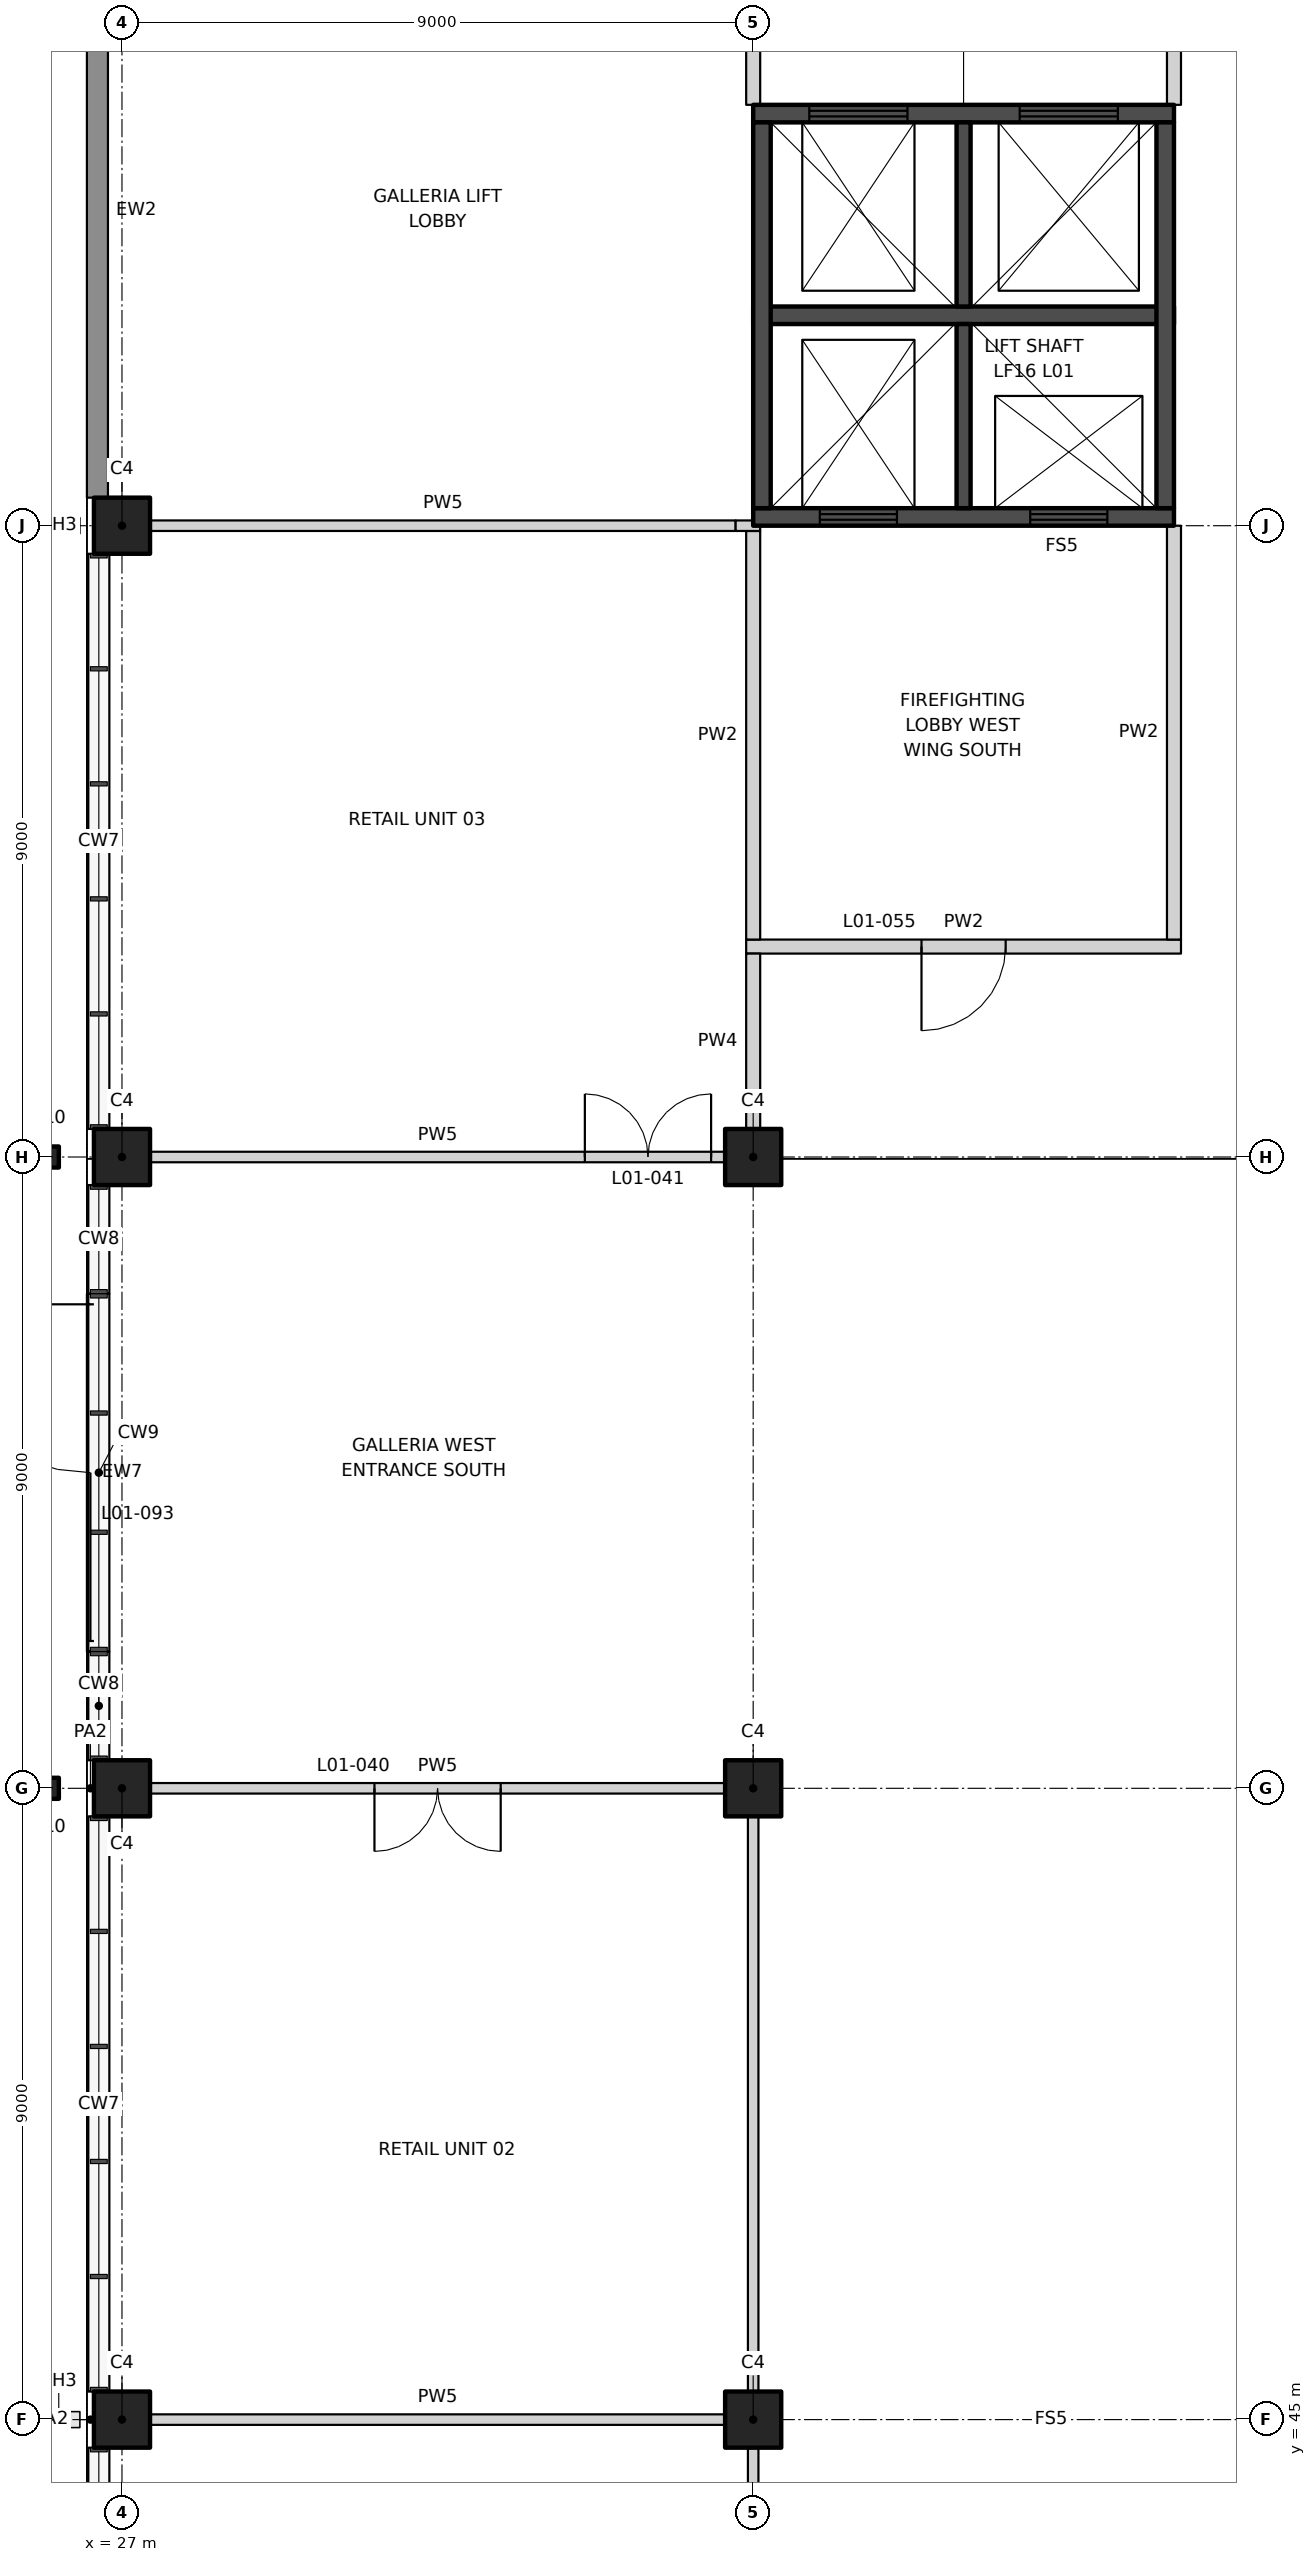
"""IFC4 building model, lengths in metres.
Left out: names, types, materials, properties, quantities, classifications, styles, units other than length and angle.
Written with IfcOpenShell. Run it as: python <this file> out.ifc"""

import sys

from ifc_helpers import new_model, si_unit, direction, frame, frame_2d, origin, origin_2d, place, context, subcontext, project, spatial, rectangle, hollow_rectangle, extrude, element, fill, save


model = new_model("IFC4")
c1 = context("Model", 3, precision=1e-05, world=origin(), true_north=direction((0.0, 1.0)))
c2 = subcontext(c1, "Body", "Model", "MODEL_VIEW")
j1 = project(units=[si_unit("LENGTHUNIT", "METRE"), si_unit("PLANEANGLEUNIT", "RADIAN")], contexts=[c1])
p1 = place(None, origin())
s1 = spatial("IfcSite", under=j1, at=p1, CompositionType="ELEMENT")
p2 = place(p1, origin())
s2 = spatial("IfcBuilding", under=s1, at=p2, CompositionType="ELEMENT")
p3 = place(p2, frame((0.0, 0.0, 7.0)))
s3 = spatial("IfcBuildingStorey", under=s2, at=p3, CompositionType="ELEMENT", Elevation=7.0)
for number, where, z_axis, x_axis in (
    (1, (27.0, 45.0, 0.0), (0.0, 0.0, 1.0), (1.0, 0.0, 0.0)),
    (2, (27.0, 54.0, 0.0), (0.0, 0.0, 1.0), (1.0, 0.0, 0.0)),
    (3, (27.0, 63.0, 0.0), (0.0, 0.0, 1.0), (1.0, 0.0, 0.0)),
    (4, (27.0, 72.0, 0.0), (0.0, 0.0, 1.0), (1.0, 0.0, 0.0)),
    (5, (36.0, 45.0, 0.0), (0.0, 0.0, 1.0), (1.0, 0.0, 0.0)),
    (6, (36.0, 54.0, 0.0), (0.0, 0.0, 1.0), (1.0, 0.0, 0.0)),
    (7, (36.0, 63.0, 0.0), (0.0, 0.0, 1.0), (1.0, 0.0, 0.0)),
):
    element("IfcColumn", number, at=place(p3, frame(where, z_axis=z_axis, x_axis=x_axis)), inside=s3, PredefinedType="COLUMN", context=c2, shape_type="SweptSolid", body=[
        extrude(rectangle(XDim=0.8, YDim=0.8, at=origin_2d()), origin(), (0.0, 0.0, 1.0), 4.5),
    ])
p4 = place(p3, frame((27.4, 45.0, 0.0), z_axis=(0.0, 0.0, 1.0), x_axis=(1.0, 0.0, 0.0)))
e8 = element("IfcWall", 8, at=p4, inside=s3, PredefinedType="PARTITIONING", context=c2, shape_type="SweptSolid", body=[
    extrude(rectangle(XDim=8.2, YDim=0.15, at=frame_2d((4.1, 0.0))), origin(), (0.0, 0.0, 1.0), 3.25),
])
p5 = place(p3, frame((27.4, 54.0, 0.0), z_axis=(0.0, 0.0, 1.0), x_axis=(1.0, 0.0, 0.0)))
e9 = element("IfcWall", 9, at=p5, inside=s3, PredefinedType="PARTITIONING", context=c2, shape_type="SweptSolid", body=[
    extrude(rectangle(XDim=8.2, YDim=0.15, at=frame_2d((4.1, 0.0))), origin(), (0.0, 0.0, 1.0), 3.25),
])
p6 = place(p5, frame((3.2, 0.0, 0.0)))
e10 = element("IfcOpeningElement", 10, at=p6, cuts=e9, PredefinedType="OPENING", context=c2, shape_type="SweptSolid", body=[
    extrude(rectangle(XDim=1.8, YDim=2.1, at=frame_2d((0.9, 1.05))), frame((0.0, 0.085, 0.0), z_axis=(0.0, -1.0, 0.0), x_axis=(1.0, 0.0, 0.0)), (0.0, 0.0, 1.0), 0.17),
])
p7 = place(p3, frame((27.4, 63.0, 0.0), z_axis=(0.0, 0.0, 1.0), x_axis=(1.0, 0.0, 0.0)))
e11 = element("IfcWall", 11, at=p7, inside=s3, PredefinedType="PARTITIONING", context=c2, shape_type="SweptSolid", body=[
    extrude(rectangle(XDim=8.2, YDim=0.15, at=frame_2d((4.1, 0.0))), origin(), (0.0, 0.0, 1.0), 3.25),
])
p8 = place(p7, frame((6.2, 0.0, 0.0)))
e12 = element("IfcOpeningElement", 12, at=p8, cuts=e11, PredefinedType="OPENING", context=c2, shape_type="SweptSolid", body=[
    extrude(rectangle(XDim=1.8, YDim=2.1, at=frame_2d((0.9, 1.05))), frame((0.0, 0.085, 0.0), z_axis=(0.0, -1.0, 0.0), x_axis=(1.0, 0.0, 0.0)), (0.0, 0.0, 1.0), 0.17),
])
p9 = place(p3, frame((35.9, 66.0, 0.0), z_axis=(0.0, 0.0, 1.0), x_axis=(1.0, 0.0, 0.0)))
e13 = element("IfcWall", 13, at=p9, inside=s3, PredefinedType="PARTITIONING", context=c2, shape_type="SweptSolid", body=[
    extrude(rectangle(XDim=6.2, YDim=0.2, at=frame_2d((3.1, 0.0))), origin(), (0.0, 0.0, 1.0), 4.5),
])
p10 = place(p9, frame((2.5, 0.0, 0.0)))
e14 = element("IfcOpeningElement", 14, at=p10, cuts=e13, PredefinedType="OPENING", context=c2, shape_type="SweptSolid", body=[
    extrude(rectangle(XDim=1.2, YDim=2.1, at=frame_2d((0.6, 1.05))), frame((0.0, 0.11, 0.0), z_axis=(0.0, -1.0, 0.0), x_axis=(1.0, 0.0, 0.0)), (0.0, 0.0, 1.0), 0.22),
])
p11 = place(p3, frame((27.4, 72.0, 0.0), z_axis=(0.0, 0.0, 1.0), x_axis=(1.0, 0.0, 0.0)))
e15 = element("IfcWall", 15, at=p11, inside=s3, PredefinedType="PARTITIONING", context=c2, shape_type="SweptSolid", body=[
    extrude(rectangle(XDim=8.35, YDim=0.15, at=frame_2d((4.175, 0.0))), origin(), (0.0, 0.0, 1.0), 3.25),
])
p12 = place(p3, frame((36.0, 36.0, 0.0), z_axis=(0.0, 0.0, 1.0), x_axis=(0.0, 1.0, 0.0)))
e16 = element("IfcWall", 16, at=p12, inside=s3, PredefinedType="PARTITIONING", context=c2, shape_type="SweptSolid", body=[
    extrude(rectangle(XDim=8.6, YDim=0.15, at=frame_2d((4.3, 0.0))), origin(), (0.0, 0.0, 1.0), 3.25),
])
p13 = place(p12, frame((3.4, 0.0, 0.0)))
e17 = element("IfcOpeningElement", 17, at=p13, cuts=e16, PredefinedType="OPENING", context=c2, shape_type="SweptSolid", body=[
    extrude(rectangle(XDim=1.8, YDim=2.1, at=frame_2d((0.9, 1.05))), frame((0.0, 0.085, 0.0), z_axis=(0.0, -1.0, 0.0), x_axis=(1.0, 0.0, 0.0)), (0.0, 0.0, 1.0), 0.17),
])
p14 = place(p3, frame((36.0, 45.4, 0.0), z_axis=(0.0, 0.0, 1.0), x_axis=(0.0, 1.0, 0.0)))
e18 = element("IfcWall", 18, at=p14, inside=s3, PredefinedType="PARTITIONING", context=c2, shape_type="SweptSolid", body=[
    extrude(rectangle(XDim=8.2, YDim=0.15, at=frame_2d((4.1, 0.0))), origin(), (0.0, 0.0, 1.0), 3.25),
])
p15 = place(p3, frame((36.0, 63.4, 0.0), z_axis=(0.0, 0.0, 1.0), x_axis=(0.0, 1.0, 0.0)))
e19 = element("IfcWall", 19, at=p15, inside=s3, PredefinedType="PARTITIONING", context=c2, shape_type="SweptSolid", body=[
    extrude(rectangle(XDim=2.5, YDim=0.2, at=frame_2d((1.25, 0.0))), origin(), (0.0, 0.0, 1.0), 3.25),
])
p16 = place(p3, frame((36.0, 66.1, 0.0), z_axis=(0.0, 0.0, 1.0), x_axis=(0.0, 1.0, 0.0)))
e20 = element("IfcWall", 20, at=p16, inside=s3, PredefinedType="PARTITIONING", context=c2, shape_type="SweptSolid", body=[
    extrude(rectangle(XDim=5.825, YDim=0.2, at=frame_2d((2.913, 0.0))), origin(), (0.0, 0.0, 1.0), 3.25),
])
p17 = place(p3, frame((36.0, 78.0, 0.0), z_axis=(0.0, 0.0, 1.0), x_axis=(0.0, 1.0, 0.0)))
e21 = element("IfcWall", 21, at=p17, inside=s3, PredefinedType="PARTITIONING", context=c2, shape_type="SweptSolid", body=[
    extrude(rectangle(XDim=2.6, YDim=0.2, at=frame_2d((1.3, 0.0))), origin(), (0.0, 0.0, 1.0), 3.45),
])
p18 = place(p3, frame((42.0, 66.1, 0.0), z_axis=(0.0, 0.0, 1.0), x_axis=(0.0, 1.0, 0.0)))
e22 = element("IfcWall", 22, at=p18, inside=s3, PredefinedType="PARTITIONING", context=c2, shape_type="SweptSolid", body=[
    extrude(rectangle(XDim=5.9, YDim=0.2, at=frame_2d((2.95, 0.0))), origin(), (0.0, 0.0, 1.0), 4.5),
])
p19 = place(p3, frame((42.0, 78.0, 0.0), z_axis=(0.0, 0.0, 1.0), x_axis=(0.0, 1.0, 0.0)))
e23 = element("IfcWall", 23, at=p19, inside=s3, PredefinedType="PARTITIONING", context=c2, shape_type="SweptSolid", body=[
    extrude(rectangle(XDim=3.0, YDim=0.2, at=frame_2d((1.5, 0.0))), origin(), (0.0, 0.0, 1.0), 4.5),
])
p20 = place(p3, frame((26.55, 61.05, 0.0), z_axis=(0.0, 0.0, 1.0), x_axis=(0.0, -1.0, 0.0)))
e24 = element("IfcWall", 24, at=p20, inside=s3, PredefinedType="SOLIDWALL", context=c2, shape_type="SweptSolid", body=[
    extrude(rectangle(XDim=5.1, YDim=0.1, at=frame_2d((2.55, 0.0))), origin(), (0.0, 0.0, 1.0), 3.1),
])
p21 = place(p20, frame((0.15, 0.0, 0.0)))
e25 = element("IfcOpeningElement", 25, at=p21, cuts=e24, PredefinedType="OPENING", context=c2, shape_type="SweptSolid", body=[
    extrude(rectangle(XDim=4.8, YDim=2.7, at=frame_2d((2.4, 1.35))), frame((0.0, 0.06, 0.0), z_axis=(0.0, -1.0, 0.0), x_axis=(1.0, 0.0, 0.0)), (0.0, 0.0, 1.0), 0.12),
])
p22 = place(p3, frame((26.65, 80.6, 0.0), z_axis=(0.0, 0.0, 1.0), x_axis=(0.0, -1.0, 0.0)))
e26 = element("IfcWall", 26, at=p22, inside=s3, PredefinedType="SOLIDWALL", context=c2, shape_type="SweptSolid", body=[
    extrude(rectangle(XDim=8.2, YDim=0.3, at=frame_2d((4.1, 0.0))), origin(), (0.0, 0.0, 1.0), 4.5),
])
for number, where, z_axis, x_axis in (
    (27, (25.95, 54.0, 0.0), (0.0, 0.0, 1.0), (1.0, 0.0, 0.0)),
    (28, (25.95, 63.0, 0.0), (0.0, 0.0, 1.0), (1.0, 0.0, 0.0)),
):
    element("IfcColumn", number, at=place(p3, frame(where, z_axis=z_axis, x_axis=x_axis)), inside=s3, PredefinedType="COLUMN", context=c2, shape_type="SweptSolid", body=[
        extrude(hollow_rectangle(XDim=0.3, YDim=0.3, WallThickness=0.012, at=origin_2d()), origin(), (0.0, 0.0, 1.0), 4.5),
    ])
p23 = place(p3, frame((36.0, 72.125, 0.0), z_axis=(0.0, 0.0, 1.0), x_axis=(1.0, 0.0, 0.0)))
e29 = element("IfcWall", 29, at=p23, inside=s3, PredefinedType="SHEAR", context=c2, shape_type="SweptSolid", body=[
    extrude(rectangle(XDim=6.0, YDim=0.25, at=frame_2d((3.0, 0.0))), origin(), (0.0, 0.0, 1.0), 4.15),
])
p24 = place(p23, frame((0.95, 0.0, 0.0)))
e30 = element("IfcOpeningElement", 30, at=p24, cuts=e29, PredefinedType="OPENING", context=c2, shape_type="SweptSolid", body=[
    extrude(rectangle(XDim=1.1, YDim=2.1, at=frame_2d((0.55, 1.05))), frame((0.0, 0.135, 0.0), z_axis=(0.0, -1.0, 0.0), x_axis=(1.0, 0.0, 0.0)), (0.0, 0.0, 1.0), 0.27),
])
p25 = place(p23, frame((3.95, 0.0, 0.0)))
e31 = element("IfcOpeningElement", 31, at=p25, cuts=e29, PredefinedType="OPENING", context=c2, shape_type="SweptSolid", body=[
    extrude(rectangle(XDim=1.1, YDim=2.1, at=frame_2d((0.55, 1.05))), frame((0.0, 0.135, 0.0), z_axis=(0.0, -1.0, 0.0), x_axis=(1.0, 0.0, 0.0)), (0.0, 0.0, 1.0), 0.27),
])
p26 = place(p3, frame((36.0, 77.875, 0.0), z_axis=(0.0, 0.0, 1.0), x_axis=(1.0, 0.0, 0.0)))
e32 = element("IfcWall", 32, at=p26, inside=s3, PredefinedType="SHEAR", context=c2, shape_type="SweptSolid", body=[
    extrude(rectangle(XDim=6.0, YDim=0.25, at=frame_2d((3.0, 0.0))), origin(), (0.0, 0.0, 1.0), 4.15),
])
p27 = place(p26, frame((0.8, 0.0, 0.0)))
e33 = element("IfcOpeningElement", 33, at=p27, cuts=e32, PredefinedType="OPENING", context=c2, shape_type="SweptSolid", body=[
    extrude(rectangle(XDim=1.4, YDim=2.1, at=frame_2d((0.7, 1.05))), frame((0.0, 0.135, 0.0), z_axis=(0.0, -1.0, 0.0), x_axis=(1.0, 0.0, 0.0)), (0.0, 0.0, 1.0), 0.27),
])
p28 = place(p26, frame((3.8, 0.0, 0.0)))
e34 = element("IfcOpeningElement", 34, at=p28, cuts=e32, PredefinedType="OPENING", context=c2, shape_type="SweptSolid", body=[
    extrude(rectangle(XDim=1.4, YDim=2.1, at=frame_2d((0.7, 1.05))), frame((0.0, 0.135, 0.0), z_axis=(0.0, -1.0, 0.0), x_axis=(1.0, 0.0, 0.0)), (0.0, 0.0, 1.0), 0.27),
])
p29 = place(p3, frame((36.0, 75.0, 0.0), z_axis=(0.0, 0.0, 1.0), x_axis=(1.0, 0.0, 0.0)))
e35 = element("IfcWall", 35, at=p29, inside=s3, PredefinedType="SHEAR", context=c2, shape_type="SweptSolid", body=[
    extrude(rectangle(XDim=6.0, YDim=0.25, at=frame_2d((3.0, 0.0))), origin(), (0.0, 0.0, 1.0), 4.15),
])
for number, where, z_axis, x_axis in (
    (36, (36.125, 72.25, 0.0), (0.0, 0.0, 1.0), (0.0, 1.0, 0.0)),
    (37, (41.875, 72.25, 0.0), (0.0, 0.0, 1.0), (0.0, 1.0, 0.0)),
):
    element("IfcWall", number, at=place(p3, frame(where, z_axis=z_axis, x_axis=x_axis)), inside=s3, PredefinedType="SHEAR", context=c2, shape_type="SweptSolid", body=[
        extrude(rectangle(XDim=5.5, YDim=0.25, at=frame_2d((2.75, 0.0))), origin(), (0.0, 0.0, 1.0), 4.15),
    ])
for number, where, z_axis, x_axis in (
    (38, (39.0, 72.25, 0.0), (0.0, 0.0, 1.0), (0.0, 1.0, 0.0)),
    (39, (39.0, 75.125, 0.0), (0.0, 0.0, 1.0), (0.0, 1.0, 0.0)),
):
    element("IfcWall", number, at=place(p3, frame(where, z_axis=z_axis, x_axis=x_axis)), inside=s3, PredefinedType="SHEAR", context=c2, shape_type="SweptSolid", body=[
        extrude(rectangle(XDim=2.625, YDim=0.2, at=frame_2d((1.312, 0.0))), origin(), (0.0, 0.0, 1.0), 4.15),
    ])
p30 = place(p3, frame((35.75, 72.0, 0.0), z_axis=(0.0, 0.0, 1.0), x_axis=(1.0, 0.0, 0.0)))
e40 = element("IfcWall", 40, at=p30, inside=s3, PredefinedType="PARTITIONING", context=c2, shape_type="SweptSolid", body=[
    extrude(rectangle(XDim=0.35, YDim=0.15, at=frame_2d((0.175, 0.0))), origin(), (0.0, 0.0, 1.0), 4.5),
])
p31 = place(p6, frame((1.8, 0.0, 0.0), z_axis=(0.0, 0.0, 1.0), x_axis=(-1.0, 0.0, 0.0)))
e41 = element("IfcDoor", 41, at=p31, inside=s3, OperationType="DOUBLE_DOOR_DOUBLE_SWING", PredefinedType="DOOR", context=c2, shape_type="SweptSolid", body=[
    extrude(rectangle(XDim=1.8, YDim=2.1, at=frame_2d((0.9, 1.05))), frame((0.0, 0.025, 0.0), z_axis=(0.0, -1.0, 0.0), x_axis=(1.0, 0.0, 0.0)), (0.0, 0.0, 1.0), 0.05),
])
fill(e10, e41)
p32 = place(p8, origin())
e42 = element("IfcDoor", 42, at=p32, inside=s3, OperationType="DOUBLE_DOOR_DOUBLE_SWING", PredefinedType="DOOR", context=c2, shape_type="SweptSolid", body=[
    extrude(rectangle(XDim=1.8, YDim=2.1, at=frame_2d((0.9, 1.05))), frame((0.0, 0.025, 0.0), z_axis=(0.0, -1.0, 0.0), x_axis=(1.0, 0.0, 0.0)), (0.0, 0.0, 1.0), 0.05),
])
fill(e12, e42)
p33 = place(p10, frame((1.2, 0.0, 0.0), z_axis=(0.0, 0.0, 1.0), x_axis=(-1.0, 0.0, 0.0)))
e43 = element("IfcDoor", 43, at=p33, inside=s3, OperationType="SINGLE_SWING_RIGHT", PredefinedType="DOOR", context=c2, shape_type="SweptSolid", body=[
    extrude(rectangle(XDim=1.2, YDim=2.1, at=frame_2d((0.6, 1.05))), frame((0.0, 0.025, 0.0), z_axis=(0.0, -1.0, 0.0), x_axis=(1.0, 0.0, 0.0)), (0.0, 0.0, 1.0), 0.05),
])
fill(e14, e43)
p34 = place(p21, frame((4.8, 0.0, 0.0), z_axis=(0.0, 0.0, 1.0), x_axis=(-1.0, 0.0, 0.0)))
e44 = element("IfcDoor", 44, at=p34, inside=s3, OperationType="DOUBLE_DOOR_SINGLE_SWING", PredefinedType="DOOR", context=c2, shape_type="SweptSolid", body=[
    extrude(rectangle(XDim=4.8, YDim=2.7, at=frame_2d((2.4, 1.35))), frame((0.0, 0.025, 0.0), z_axis=(0.0, -1.0, 0.0), x_axis=(1.0, 0.0, 0.0)), (0.0, 0.0, 1.0), 0.05),
])
fill(e25, e44)
p35 = place(p24, origin())
e45 = element("IfcDoor", 45, at=p35, inside=s3, OperationType="DOUBLE_DOOR_SLIDING", PredefinedType="DOOR", context=c2, shape_type="SweptSolid", body=[
    extrude(rectangle(XDim=1.1, YDim=2.1, at=frame_2d((0.55, 1.05))), frame((0.0, 0.025, 0.0), z_axis=(0.0, -1.0, 0.0), x_axis=(1.0, 0.0, 0.0)), (0.0, 0.0, 1.0), 0.05),
])
fill(e30, e45)
p36 = place(p25, origin())
e46 = element("IfcDoor", 46, at=p36, inside=s3, OperationType="DOUBLE_DOOR_SLIDING", PredefinedType="DOOR", context=c2, shape_type="SweptSolid", body=[
    extrude(rectangle(XDim=1.1, YDim=2.1, at=frame_2d((0.55, 1.05))), frame((0.0, 0.025, 0.0), z_axis=(0.0, -1.0, 0.0), x_axis=(1.0, 0.0, 0.0)), (0.0, 0.0, 1.0), 0.05),
])
fill(e31, e46)
p37 = place(p27, origin())
e47 = element("IfcDoor", 47, at=p37, inside=s3, OperationType="DOUBLE_DOOR_SLIDING", PredefinedType="DOOR", context=c2, shape_type="SweptSolid", body=[
    extrude(rectangle(XDim=1.4, YDim=2.1, at=frame_2d((0.7, 1.05))), frame((0.0, 0.025, 0.0), z_axis=(0.0, -1.0, 0.0), x_axis=(1.0, 0.0, 0.0)), (0.0, 0.0, 1.0), 0.05),
])
fill(e33, e47)
p38 = place(p28, origin())
e48 = element("IfcDoor", 48, at=p38, inside=s3, OperationType="DOUBLE_DOOR_SLIDING", PredefinedType="DOOR", context=c2, shape_type="SweptSolid", body=[
    extrude(rectangle(XDim=1.4, YDim=2.1, at=frame_2d((0.7, 1.05))), frame((0.0, 0.025, 0.0), z_axis=(0.0, -1.0, 0.0), x_axis=(1.0, 0.0, 0.0)), (0.0, 0.0, 1.0), 0.05),
])
fill(e34, e48)
save(model, sys.argv[1])
